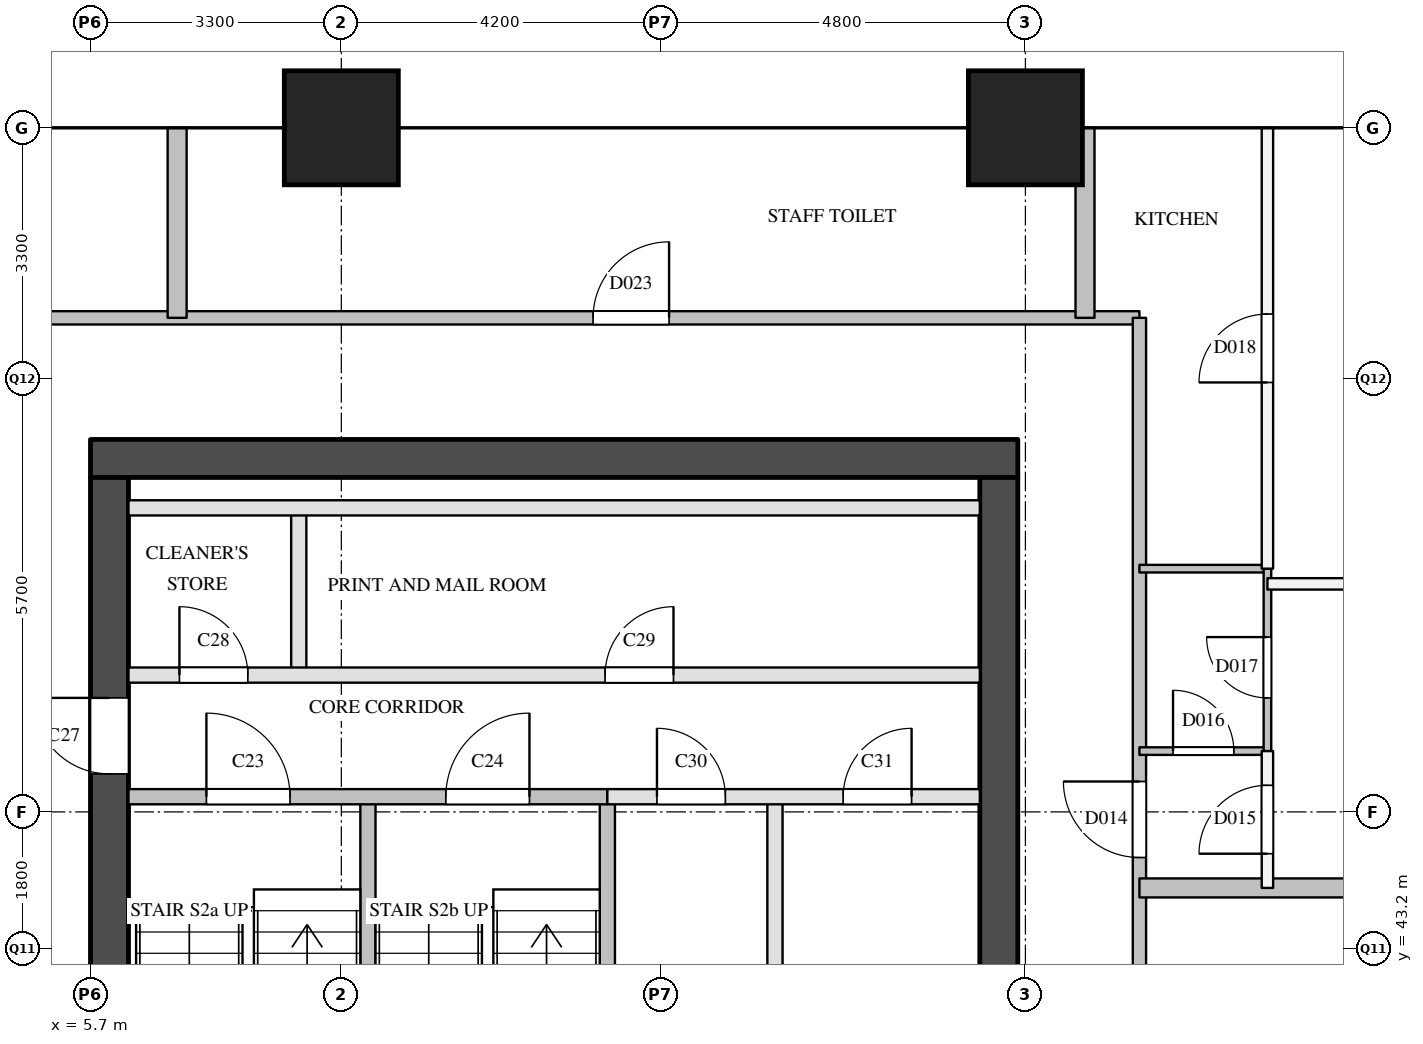
"""IFC4 building model, lengths in metres.
Left out: names, types, materials, properties, quantities, classifications, styles, units other than length and angle.
Written with IfcOpenShell. Run it as: python <this file> out.ifc"""

import sys

from ifc_helpers import new_model, si_unit, direction, frame, frame_2d, origin, origin_2d, place, context, subcontext, project, spatial, rectangle, extrude, element, fill, save


model = new_model("IFC4")
c1 = context("Model", 3, precision=1e-05, world=origin(), true_north=direction((0.0, 1.0)))
c2 = subcontext(c1, "Body", "Model", "MODEL_VIEW")
j1 = project(units=[si_unit("LENGTHUNIT", "METRE"), si_unit("PLANEANGLEUNIT", "RADIAN")], contexts=[c1])
p1 = place(None, origin())
s1 = spatial("IfcSite", under=j1, at=p1, CompositionType="ELEMENT")
p2 = place(p1, origin())
s2 = spatial("IfcBuilding", under=s1, at=p2, CompositionType="ELEMENT")
p3 = place(p2, frame((0.0, 0.0, 173.9)))
s3 = spatial("IfcBuildingStorey", under=s2, at=p3, CompositionType="ELEMENT", Elevation=173.9)
for number, where, z_axis, x_axis in (
    (1, (9.0, 54.0, 0.0), (0.0, 0.0, 1.0), (1.0, 0.0, 0.0)),
    (2, (18.0, 54.0, 0.0), (0.0, 0.0, 1.0), (1.0, 0.0, 0.0)),
):
    element("IfcColumn", number, at=place(p3, frame(where, z_axis=z_axis, x_axis=x_axis)), inside=s3, PredefinedType="COLUMN", context=c2, shape_type="SweptSolid", body=[
        extrude(rectangle(XDim=1.5, YDim=1.5, at=origin_2d()), origin(), (0.0, 0.0, 1.0), 3.9),
    ])
p4 = place(p3, frame((5.7, 49.65, 0.0), z_axis=(0.0, 0.0, 1.0), x_axis=(1.0, 0.0, 0.0)))
e3 = element("IfcWall", 3, at=p4, inside=s3, PredefinedType="SHEAR", context=c2, shape_type="SweptSolid", body=[
    extrude(rectangle(XDim=12.2, YDim=0.5, at=frame_2d((6.1, 0.0))), origin(), (0.0, 0.0, 1.0), 3.6),
])
p5 = place(p3, frame((5.95, 29.1, 0.0), z_axis=(0.0, 0.0, 1.0), x_axis=(0.0, 1.0, 0.0)))
e4 = element("IfcWall", 4, at=p5, inside=s3, PredefinedType="SHEAR", context=c2, shape_type="SweptSolid", body=[
    extrude(rectangle(XDim=20.3, YDim=0.5, at=frame_2d((10.15, 0.0))), origin(), (0.0, 0.0, 1.0), 3.6),
])
p6 = place(p5, frame((3.45, 0.0, 0.0)))
e5 = element("IfcOpeningElement", 5, at=p6, cuts=e4, PredefinedType="OPENING", context=c2, shape_type="SweptSolid", body=[
    extrude(rectangle(XDim=1.0, YDim=2.1, at=frame_2d((0.5, 1.05))), frame((0.0, 0.26, 0.0), z_axis=(0.0, -1.0, 0.0), x_axis=(1.0, 0.0, 0.0)), (0.0, 0.0, 1.0), 0.52),
])
p7 = place(p5, frame((16.4, 0.0, 0.0)))
e6 = element("IfcOpeningElement", 6, at=p7, cuts=e4, PredefinedType="OPENING", context=c2, shape_type="SweptSolid", body=[
    extrude(rectangle(XDim=1.0, YDim=2.1, at=frame_2d((0.5, 1.05))), frame((0.0, 0.26, 0.0), z_axis=(0.0, -1.0, 0.0), x_axis=(1.0, 0.0, 0.0)), (0.0, 0.0, 1.0), 0.52),
])
p8 = place(p3, frame((17.65, 29.1, 0.0), z_axis=(0.0, 0.0, 1.0), x_axis=(0.0, 1.0, 0.0)))
e7 = element("IfcWall", 7, at=p8, inside=s3, PredefinedType="SHEAR", context=c2, shape_type="SweptSolid", body=[
    extrude(rectangle(XDim=20.3, YDim=0.5, at=frame_2d((10.15, 0.0))), origin(), (0.0, 0.0, 1.0), 3.6),
])
p9 = place(p8, frame((1.25, 0.0, 0.0)))
e8 = element("IfcOpeningElement", 8, at=p9, cuts=e7, PredefinedType="OPENING", context=c2, shape_type="SweptSolid", body=[
    extrude(rectangle(XDim=0.7, YDim=2.1, at=frame_2d((0.35, 1.05))), frame((0.0, 0.26, 0.0), z_axis=(0.0, -1.0, 0.0), x_axis=(1.0, 0.0, 0.0)), (0.0, 0.0, 1.0), 0.52),
])
p10 = place(p8, frame((7.05, 0.0, 0.0)))
e9 = element("IfcOpeningElement", 9, at=p10, cuts=e7, PredefinedType="OPENING", context=c2, shape_type="SweptSolid", body=[
    extrude(rectangle(XDim=0.7, YDim=2.1, at=frame_2d((0.35, 1.05))), frame((0.0, 0.26, 0.0), z_axis=(0.0, -1.0, 0.0), x_axis=(1.0, 0.0, 0.0)), (0.0, 0.0, 1.0), 0.52),
])
p11 = place(p8, frame((3.6, 0.0, 0.0)))
e10 = element("IfcOpeningElement", 10, at=p11, cuts=e7, PredefinedType="OPENING", context=c2, shape_type="SweptSolid", body=[
    extrude(rectangle(XDim=1.8, YDim=2.1, at=frame_2d((0.9, 1.05))), frame((0.0, 0.26, 0.0), z_axis=(0.0, -1.0, 0.0), x_axis=(1.0, 0.0, 0.0)), (0.0, 0.0, 1.0), 0.52),
])
p12 = place(p3, frame((8.44, 46.8, 0.0), z_axis=(0.0, 0.0, 1.0), x_axis=(0.0, 1.0, 0.0)))
e11 = element("IfcWall", 11, at=p12, inside=s3, PredefinedType="PARTITIONING", context=c2, shape_type="SweptSolid", body=[
    extrude(rectangle(XDim=2.2, YDim=0.2, at=frame_2d((1.1, 0.0))), origin(), (0.0, 0.0, 1.0), 3.6),
])
for number, where, z_axis, x_axis in (
    (12, (9.35, 40.9, 0.0), (0.0, 0.0, 1.0), (0.0, 1.0, 0.0)),
    (13, (12.5, 40.9, 0.0), (0.0, 0.0, 1.0), (0.0, 1.0, 0.0)),
):
    element("IfcWall", number, at=place(p3, frame(where, z_axis=z_axis, x_axis=x_axis)), inside=s3, PredefinedType="SOLIDWALL", context=c2, shape_type="SweptSolid", body=[
        extrude(rectangle(XDim=4.3, YDim=0.2, at=frame_2d((2.15, 0.0))), origin(), (0.0, 0.0, 1.0), 3.6),
    ])
p13 = place(p3, frame((14.705, 39.0, 0.0), z_axis=(0.0, 0.0, 1.0), x_axis=(0.0, 1.0, 0.0)))
e14 = element("IfcWall", 14, at=p13, inside=s3, PredefinedType="PARTITIONING", context=c2, shape_type="SweptSolid", body=[
    extrude(rectangle(XDim=6.2, YDim=0.2, at=frame_2d((3.1, 0.0))), origin(), (0.0, 0.0, 1.0), 3.6),
])
p14 = place(p3, frame((12.5, 45.2, 0.0), z_axis=(0.0, 0.0, 1.0), x_axis=(1.0, 0.0, 0.0)))
e15 = element("IfcWall", 15, at=p14, inside=s3, PredefinedType="PARTITIONING", context=c2, shape_type="SweptSolid", body=[
    extrude(rectangle(XDim=4.9, YDim=0.2, at=frame_2d((2.45, 0.0))), origin(), (0.0, 0.0, 1.0), 3.6),
])
p15 = place(p14, frame((0.653, 0.0, 0.0)))
e16 = element("IfcOpeningElement", 16, at=p15, cuts=e15, PredefinedType="OPENING", context=c2, shape_type="SweptSolid", body=[
    extrude(rectangle(XDim=0.9, YDim=2.1, at=frame_2d((0.45, 1.05))), frame((0.0, 0.11, 0.0), z_axis=(0.0, -1.0, 0.0), x_axis=(1.0, 0.0, 0.0)), (0.0, 0.0, 1.0), 0.22),
])
p16 = place(p14, frame((3.103, 0.0, 0.0)))
e17 = element("IfcOpeningElement", 17, at=p16, cuts=e15, PredefinedType="OPENING", context=c2, shape_type="SweptSolid", body=[
    extrude(rectangle(XDim=0.9, YDim=2.1, at=frame_2d((0.45, 1.05))), frame((0.0, 0.11, 0.0), z_axis=(0.0, -1.0, 0.0), x_axis=(1.0, 0.0, 0.0)), (0.0, 0.0, 1.0), 0.22),
])
p17 = place(p3, frame((6.2, 45.2, 0.0), z_axis=(0.0, 0.0, 1.0), x_axis=(1.0, 0.0, 0.0)))
e18 = element("IfcWall", 18, at=p17, inside=s3, PredefinedType="SOLIDWALL", context=c2, shape_type="SweptSolid", body=[
    extrude(rectangle(XDim=6.3, YDim=0.2, at=frame_2d((3.15, 0.0))), origin(), (0.0, 0.0, 1.0), 3.6),
])
p18 = place(p17, frame((1.025, 0.0, 0.0)))
e19 = element("IfcOpeningElement", 19, at=p18, cuts=e18, PredefinedType="OPENING", context=c2, shape_type="SweptSolid", body=[
    extrude(rectangle(XDim=1.1, YDim=2.1, at=frame_2d((0.55, 1.05))), frame((0.0, 0.11, 0.0), z_axis=(0.0, -1.0, 0.0), x_axis=(1.0, 0.0, 0.0)), (0.0, 0.0, 1.0), 0.22),
])
p19 = place(p17, frame((4.175, 0.0, 0.0)))
e20 = element("IfcOpeningElement", 20, at=p19, cuts=e18, PredefinedType="OPENING", context=c2, shape_type="SweptSolid", body=[
    extrude(rectangle(XDim=1.1, YDim=2.1, at=frame_2d((0.55, 1.05))), frame((0.0, 0.11, 0.0), z_axis=(0.0, -1.0, 0.0), x_axis=(1.0, 0.0, 0.0)), (0.0, 0.0, 1.0), 0.22),
])
p20 = place(p3, frame((6.2, 46.8, 0.0), z_axis=(0.0, 0.0, 1.0), x_axis=(1.0, 0.0, 0.0)))
e21 = element("IfcWall", 21, at=p20, inside=s3, PredefinedType="PARTITIONING", context=c2, shape_type="SweptSolid", body=[
    extrude(rectangle(XDim=11.2, YDim=0.2, at=frame_2d((5.6, 0.0))), origin(), (0.0, 0.0, 1.0), 3.6),
])
p21 = place(p20, frame((0.67, 0.0, 0.0)))
e22 = element("IfcOpeningElement", 22, at=p21, cuts=e21, PredefinedType="OPENING", context=c2, shape_type="SweptSolid", body=[
    extrude(rectangle(XDim=0.9, YDim=2.1, at=frame_2d((0.45, 1.05))), frame((0.0, 0.11, 0.0), z_axis=(0.0, -1.0, 0.0), x_axis=(1.0, 0.0, 0.0)), (0.0, 0.0, 1.0), 0.22),
])
p22 = place(p20, frame((6.27, 0.0, 0.0)))
e23 = element("IfcOpeningElement", 23, at=p22, cuts=e21, PredefinedType="OPENING", context=c2, shape_type="SweptSolid", body=[
    extrude(rectangle(XDim=0.9, YDim=2.1, at=frame_2d((0.45, 1.05))), frame((0.0, 0.11, 0.0), z_axis=(0.0, -1.0, 0.0), x_axis=(1.0, 0.0, 0.0)), (0.0, 0.0, 1.0), 0.22),
])
p23 = place(p3, frame((6.2, 49.0, 0.0), z_axis=(0.0, 0.0, 1.0), x_axis=(1.0, 0.0, 0.0)))
e24 = element("IfcWall", 24, at=p23, inside=s3, PredefinedType="PARTITIONING", context=c2, shape_type="SweptSolid", body=[
    extrude(rectangle(XDim=11.2, YDim=0.2, at=frame_2d((5.6, 0.0))), origin(), (0.0, 0.0, 1.0), 3.6),
])
p24 = place(p3, frame((4.1, 51.5, 0.0), z_axis=(0.0, 0.0, 1.0), x_axis=(1.0, 0.0, 0.0)))
e25 = element("IfcWall", 25, at=p24, inside=s3, PredefinedType="PARTITIONING", context=c2, shape_type="SweptSolid", body=[
    extrude(rectangle(XDim=15.4, YDim=0.175, at=frame_2d((7.7, 0.0))), origin(), (0.0, 0.0, 1.0), 3.6),
])
p25 = place(p24, frame((8.212, 0.0, 0.0)))
e26 = element("IfcOpeningElement", 26, at=p25, cuts=e25, PredefinedType="OPENING", context=c2, shape_type="SweptSolid", body=[
    extrude(rectangle(XDim=1.0, YDim=2.1, at=frame_2d((0.5, 1.05))), frame((0.0, 0.097, 0.0), z_axis=(0.0, -1.0, 0.0), x_axis=(1.0, 0.0, 0.0)), (0.0, 0.0, 1.0), 0.195),
])
p26 = place(p3, frame((19.5, 40.75, 0.0), z_axis=(0.0, 0.0, 1.0), x_axis=(0.0, 1.0, 0.0)))
e27 = element("IfcWall", 27, at=p26, inside=s3, PredefinedType="PARTITIONING", context=c2, shape_type="SweptSolid", body=[
    extrude(rectangle(XDim=10.75, YDim=0.175, at=frame_2d((5.375, 0.0))), origin(), (0.0, 0.0, 1.0), 3.6),
])
p27 = place(p26, frame((3.65, 0.0, 0.0)))
e28 = element("IfcOpeningElement", 28, at=p27, cuts=e27, PredefinedType="OPENING", context=c2, shape_type="SweptSolid", body=[
    extrude(rectangle(XDim=1.0, YDim=2.1, at=frame_2d((0.5, 1.05))), frame((0.0, 0.097, 0.0), z_axis=(0.0, -1.0, 0.0), x_axis=(1.0, 0.0, 0.0)), (0.0, 0.0, 1.0), 0.195),
])
p28 = place(p3, frame((21.184, 48.0, 0.0), z_axis=(0.0, 0.0, 1.0), x_axis=(1.0, 0.0, 0.0)))
e29 = element("IfcWall", 29, at=p28, inside=s3, PredefinedType="PARTITIONING", context=c2, shape_type="SweptSolid", body=[
    extrude(rectangle(XDim=10.816, YDim=0.15, at=frame_2d((5.408, 0.0))), origin(), (0.0, 0.0, 1.0), 2.6),
])
p29 = place(p28, frame((2.416, 0.0, 0.0)))
e30 = element("IfcOpeningElement", 30, at=p29, cuts=e29, PredefinedType="OPENING", context=c2, shape_type="SweptSolid", body=[
    extrude(rectangle(XDim=0.9, YDim=2.1, at=frame_2d((0.45, 1.05))), frame((0.0, 0.085, 0.0), z_axis=(0.0, -1.0, 0.0), x_axis=(1.0, 0.0, 0.0)), (0.0, 0.0, 1.0), 0.17),
])
p30 = place(p28, frame((7.824, 0.0, 0.0)))
e31 = element("IfcOpeningElement", 31, at=p30, cuts=e29, PredefinedType="OPENING", context=c2, shape_type="SweptSolid", body=[
    extrude(rectangle(XDim=0.9, YDim=2.1, at=frame_2d((0.45, 1.05))), frame((0.0, 0.085, 0.0), z_axis=(0.0, -1.0, 0.0), x_axis=(1.0, 0.0, 0.0)), (0.0, 0.0, 1.0), 0.17),
])
p31 = place(p3, frame((21.184, 44.0, 0.0), z_axis=(0.0, 0.0, 1.0), x_axis=(0.0, 1.0, 0.0)))
e32 = element("IfcWall", 32, at=p31, inside=s3, PredefinedType="PARTITIONING", context=c2, shape_type="SweptSolid", body=[
    extrude(rectangle(XDim=1.8, YDim=0.15, at=frame_2d((0.9, 0.0))), origin(), (0.0, 0.0, 1.0), 3.6),
])
p32 = place(p31, frame((0.45, 0.0, 0.0)))
e33 = element("IfcOpeningElement", 33, at=p32, cuts=e32, PredefinedType="OPENING", context=c2, shape_type="SweptSolid", body=[
    extrude(rectangle(XDim=0.9, YDim=2.1, at=frame_2d((0.45, 1.05))), frame((0.0, 0.085, 0.0), z_axis=(0.0, -1.0, 0.0), x_axis=(1.0, 0.0, 0.0)), (0.0, 0.0, 1.0), 0.17),
])
p33 = place(p3, frame((21.184, 48.2, 0.0), z_axis=(0.0, 0.0, 1.0), x_axis=(0.0, 1.0, 0.0)))
e34 = element("IfcWall", 34, at=p33, inside=s3, PredefinedType="PARTITIONING", context=c2, shape_type="SweptSolid", body=[
    extrude(rectangle(XDim=5.8, YDim=0.15, at=frame_2d((2.9, 0.0))), origin(), (0.0, 0.0, 1.0), 2.6),
])
p34 = place(p33, frame((2.45, 0.0, 0.0)))
e35 = element("IfcOpeningElement", 35, at=p34, cuts=e34, PredefinedType="OPENING", context=c2, shape_type="SweptSolid", body=[
    extrude(rectangle(XDim=0.9, YDim=2.1, at=frame_2d((0.45, 1.05))), frame((0.0, 0.085, 0.0), z_axis=(0.0, -1.0, 0.0), x_axis=(1.0, 0.0, 0.0)), (0.0, 0.0, 1.0), 0.17),
])
p35 = place(p3, frame((19.5, 44.0, 0.0), z_axis=(0.0, 0.0, 1.0), x_axis=(1.0, 0.0, 0.0)))
e36 = element("IfcWall", 36, at=p35, inside=s3, PredefinedType="PARTITIONING", context=c2, shape_type="SweptSolid", body=[
    extrude(rectangle(XDim=12.5, YDim=0.25, at=frame_2d((6.25, 0.0))), origin(), (0.0, 0.0, 1.0), 2.6),
])
for number, where, z_axis, x_axis in (
    (37, (6.84, 51.5, 0.0), (0.0, 0.0, 1.0), (0.0, 1.0, 0.0)),
    (38, (18.784, 51.5, 0.0), (0.0, 0.0, 1.0), (0.0, 1.0, 0.0)),
):
    element("IfcWall", number, at=place(p3, frame(where, z_axis=z_axis, x_axis=x_axis)), inside=s3, PredefinedType="PARTITIONING", context=c2, shape_type="SweptSolid", body=[
        extrude(rectangle(XDim=2.5, YDim=0.25, at=frame_2d((1.25, 0.0))), origin(), (0.0, 0.0, 1.0), 2.6),
    ])
p36 = place(p3, frame((19.5, 45.8, 0.0), z_axis=(0.0, 0.0, 1.0), x_axis=(1.0, 0.0, 0.0)))
e39 = element("IfcWall", 39, at=p36, inside=s3, PredefinedType="PARTITIONING", context=c2, shape_type="SweptSolid", body=[
    extrude(rectangle(XDim=1.684, YDim=0.1, at=frame_2d((0.842, 0.0))), origin(), (0.0, 0.0, 1.0), 3.6),
])
p37 = place(p36, frame((0.442, 0.0, 0.0)))
e40 = element("IfcOpeningElement", 40, at=p37, cuts=e39, PredefinedType="OPENING", context=c2, shape_type="SweptSolid", body=[
    extrude(rectangle(XDim=0.8, YDim=2.1, at=frame_2d((0.4, 1.05))), frame((0.0, 0.06, 0.0), z_axis=(0.0, -1.0, 0.0), x_axis=(1.0, 0.0, 0.0)), (0.0, 0.0, 1.0), 0.12),
])
p38 = place(p3, frame((19.5, 48.2, 0.0), z_axis=(0.0, 0.0, 1.0), x_axis=(1.0, 0.0, 0.0)))
e41 = element("IfcWall", 41, at=p38, inside=s3, PredefinedType="PARTITIONING", context=c2, shape_type="SweptSolid", body=[
    extrude(rectangle(XDim=1.684, YDim=0.1, at=frame_2d((0.842, 0.0))), origin(), (0.0, 0.0, 1.0), 3.6),
])
p39 = place(p3, frame((21.184, 45.8, 0.0), z_axis=(0.0, 0.0, 1.0), x_axis=(0.0, 1.0, 0.0)))
e42 = element("IfcWall", 42, at=p39, inside=s3, PredefinedType="PARTITIONING", context=c2, shape_type="SweptSolid", body=[
    extrude(rectangle(XDim=2.4, YDim=0.1, at=frame_2d((1.2, 0.0))), origin(), (0.0, 0.0, 1.0), 3.6),
])
p40 = place(p39, frame((0.7, 0.0, 0.0)))
e43 = element("IfcOpeningElement", 43, at=p40, cuts=e42, PredefinedType="OPENING", context=c2, shape_type="SweptSolid", body=[
    extrude(rectangle(XDim=0.8, YDim=2.1, at=frame_2d((0.4, 1.05))), frame((0.0, 0.06, 0.0), z_axis=(0.0, -1.0, 0.0), x_axis=(1.0, 0.0, 0.0)), (0.0, 0.0, 1.0), 0.12),
])
p41 = place(p18, origin())
e44 = element("IfcDoor", 44, at=p41, inside=s3, OperationType="SINGLE_SWING_LEFT", PredefinedType="DOOR", context=c2, shape_type="SweptSolid", body=[
    extrude(rectangle(XDim=1.1, YDim=2.1, at=frame_2d((0.55, 1.05))), frame((0.0, 0.025, 0.0), z_axis=(0.0, -1.0, 0.0), x_axis=(1.0, 0.0, 0.0)), (0.0, 0.0, 1.0), 0.05),
])
fill(e19, e44)
p42 = place(p19, origin())
e45 = element("IfcDoor", 45, at=p42, inside=s3, OperationType="SINGLE_SWING_RIGHT", PredefinedType="DOOR", context=c2, shape_type="SweptSolid", body=[
    extrude(rectangle(XDim=1.1, YDim=2.1, at=frame_2d((0.55, 1.05))), frame((0.0, 0.025, 0.0), z_axis=(0.0, -1.0, 0.0), x_axis=(1.0, 0.0, 0.0)), (0.0, 0.0, 1.0), 0.05),
])
fill(e20, e45)
p43 = place(p7, origin())
e46 = element("IfcDoor", 46, at=p43, inside=s3, OperationType="SINGLE_SWING_RIGHT", PredefinedType="DOOR", context=c2, shape_type="SweptSolid", body=[
    extrude(rectangle(XDim=1.0, YDim=2.1, at=frame_2d((0.5, 1.05))), frame((0.0, 0.025, 0.0), z_axis=(0.0, -1.0, 0.0), x_axis=(1.0, 0.0, 0.0)), (0.0, 0.0, 1.0), 0.05),
])
fill(e6, e46)
p44 = place(p21, origin())
e47 = element("IfcDoor", 47, at=p44, inside=s3, OperationType="SINGLE_SWING_LEFT", PredefinedType="DOOR", context=c2, shape_type="SweptSolid", body=[
    extrude(rectangle(XDim=0.9, YDim=2.1, at=frame_2d((0.45, 1.05))), frame((0.0, 0.025, 0.0), z_axis=(0.0, -1.0, 0.0), x_axis=(1.0, 0.0, 0.0)), (0.0, 0.0, 1.0), 0.05),
])
fill(e22, e47)
p45 = place(p22, origin())
e48 = element("IfcDoor", 48, at=p45, inside=s3, OperationType="SINGLE_SWING_RIGHT", PredefinedType="DOOR", context=c2, shape_type="SweptSolid", body=[
    extrude(rectangle(XDim=0.9, YDim=2.1, at=frame_2d((0.45, 1.05))), frame((0.0, 0.025, 0.0), z_axis=(0.0, -1.0, 0.0), x_axis=(1.0, 0.0, 0.0)), (0.0, 0.0, 1.0), 0.05),
])
fill(e23, e48)
p46 = place(p15, origin())
e49 = element("IfcDoor", 49, at=p46, inside=s3, OperationType="SINGLE_SWING_LEFT", PredefinedType="DOOR", context=c2, shape_type="SweptSolid", body=[
    extrude(rectangle(XDim=0.9, YDim=2.1, at=frame_2d((0.45, 1.05))), frame((0.0, 0.025, 0.0), z_axis=(0.0, -1.0, 0.0), x_axis=(1.0, 0.0, 0.0)), (0.0, 0.0, 1.0), 0.05),
])
fill(e16, e49)
p47 = place(p16, origin())
e50 = element("IfcDoor", 50, at=p47, inside=s3, OperationType="SINGLE_SWING_RIGHT", PredefinedType="DOOR", context=c2, shape_type="SweptSolid", body=[
    extrude(rectangle(XDim=0.9, YDim=2.1, at=frame_2d((0.45, 1.05))), frame((0.0, 0.025, 0.0), z_axis=(0.0, -1.0, 0.0), x_axis=(1.0, 0.0, 0.0)), (0.0, 0.0, 1.0), 0.05),
])
fill(e17, e50)
p48 = place(p27, origin())
e51 = element("IfcDoor", 51, at=p48, inside=s3, OperationType="SINGLE_SWING_RIGHT", PredefinedType="DOOR", context=c2, shape_type="SweptSolid", body=[
    extrude(rectangle(XDim=1.0, YDim=2.1, at=frame_2d((0.5, 1.05))), frame((0.0, 0.025, 0.0), z_axis=(0.0, -1.0, 0.0), x_axis=(1.0, 0.0, 0.0)), (0.0, 0.0, 1.0), 0.05),
])
fill(e28, e51)
p49 = place(p32, origin())
e52 = element("IfcDoor", 52, at=p49, inside=s3, OperationType="SINGLE_SWING_LEFT", PredefinedType="DOOR", context=c2, shape_type="SweptSolid", body=[
    extrude(rectangle(XDim=0.9, YDim=2.1, at=frame_2d((0.45, 1.05))), frame((0.0, 0.025, 0.0), z_axis=(0.0, -1.0, 0.0), x_axis=(1.0, 0.0, 0.0)), (0.0, 0.0, 1.0), 0.05),
])
fill(e33, e52)
p50 = place(p37, origin())
e53 = element("IfcDoor", 53, at=p50, inside=s3, OperationType="SINGLE_SWING_LEFT", PredefinedType="DOOR", context=c2, shape_type="SweptSolid", body=[
    extrude(rectangle(XDim=0.8, YDim=2.1, at=frame_2d((0.4, 1.05))), frame((0.0, 0.025, 0.0), z_axis=(0.0, -1.0, 0.0), x_axis=(1.0, 0.0, 0.0)), (0.0, 0.0, 1.0), 0.05),
])
fill(e40, e53)
p51 = place(p40, origin())
e54 = element("IfcDoor", 54, at=p51, inside=s3, OperationType="SINGLE_SWING_RIGHT", PredefinedType="DOOR", context=c2, shape_type="SweptSolid", body=[
    extrude(rectangle(XDim=0.8, YDim=2.1, at=frame_2d((0.4, 1.05))), frame((0.0, 0.025, 0.0), z_axis=(0.0, -1.0, 0.0), x_axis=(1.0, 0.0, 0.0)), (0.0, 0.0, 1.0), 0.05),
])
fill(e43, e54)
p52 = place(p34, origin())
e55 = element("IfcDoor", 55, at=p52, inside=s3, OperationType="SINGLE_SWING_LEFT", PredefinedType="DOOR", context=c2, shape_type="SweptSolid", body=[
    extrude(rectangle(XDim=0.9, YDim=2.1, at=frame_2d((0.45, 1.05))), frame((0.0, 0.025, 0.0), z_axis=(0.0, -1.0, 0.0), x_axis=(1.0, 0.0, 0.0)), (0.0, 0.0, 1.0), 0.05),
])
fill(e35, e55)
p53 = place(p25, origin())
e56 = element("IfcDoor", 56, at=p53, inside=s3, OperationType="SINGLE_SWING_RIGHT", PredefinedType="DOOR", context=c2, shape_type="SweptSolid", body=[
    extrude(rectangle(XDim=1.0, YDim=2.1, at=frame_2d((0.5, 1.05))), frame((0.0, 0.025, 0.0), z_axis=(0.0, -1.0, 0.0), x_axis=(1.0, 0.0, 0.0)), (0.0, 0.0, 1.0), 0.05),
])
fill(e26, e56)
save(model, sys.argv[1])
